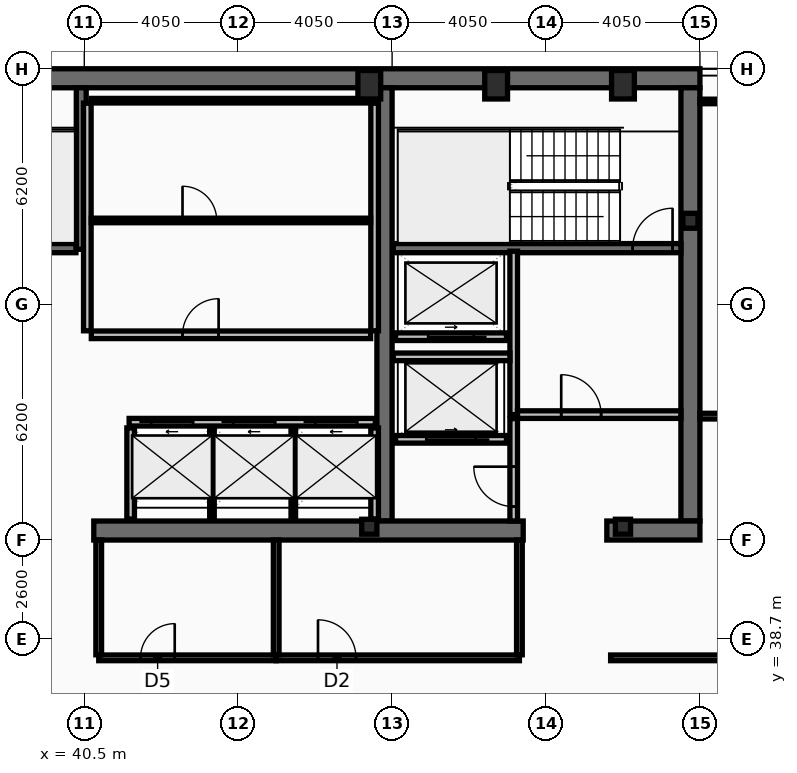
"""IFC4 building model, lengths in metres.
Left out: names, types, materials, properties, quantities, classifications, styles, units other than length and angle.
Written with IfcOpenShell. Run it as: python <this file> out.ifc"""

import sys

from ifc_helpers import new_model, si_unit, direction, frame, frame_2d, origin, origin_2d, place, context, subcontext, project, spatial, rectangle, hollow_rectangle, i_section, extrude, element, fill, save


model = new_model("IFC4")
c1 = context("Model", 3, precision=1e-05, world=origin(), true_north=direction((0.0, 1.0)))
c2 = subcontext(c1, "Body", "Model", "MODEL_VIEW")
j1 = project(units=[si_unit("LENGTHUNIT", "METRE"), si_unit("PLANEANGLEUNIT", "RADIAN")], contexts=[c1])
p1 = place(None, origin())
s1 = spatial("IfcSite", under=j1, at=p1, CompositionType="ELEMENT")
p2 = place(p1, origin())
s2 = spatial("IfcBuilding", under=s1, at=p2, CompositionType="ELEMENT")
p3 = place(p2, frame((0.0, 0.0, 280.6)))
s3 = spatial("IfcBuildingStorey", under=s2, at=p3, CompositionType="ELEMENT", Elevation=280.6)
p4 = place(p3, frame((16.2, 53.45, 0.0), z_axis=(0.0, 0.0, 1.0), x_axis=(1.0, 0.0, 0.0)))
e1 = element("IfcWall", 1, at=p4, inside=s3, PredefinedType="SHEAR", context=c2, shape_type="SweptSolid", body=[
    extrude(rectangle(XDim=40.5, YDim=0.5, at=frame_2d((20.25, 0.0))), origin(), (0.0, 0.0, 1.0), 3.44),
])
p5 = place(p3, frame((56.45, 53.2, 0.0), z_axis=(0.0, 0.0, 1.0), x_axis=(0.0, -1.0, 0.0)))
e2 = element("IfcWall", 2, at=p5, inside=s3, PredefinedType="SHEAR", context=c2, shape_type="SweptSolid", body=[
    extrude(rectangle(XDim=11.4, YDim=0.5, at=frame_2d((5.7, 0.0))), origin(), (0.0, 0.0, 1.0), 3.44),
])
p6 = place(p3, frame((48.4, 41.8, 0.0), z_axis=(0.0, 0.0, 1.0), x_axis=(0.0, 1.0, 0.0)))
e3 = element("IfcWall", 3, at=p6, inside=s3, PredefinedType="SHEAR", context=c2, shape_type="SweptSolid", body=[
    extrude(rectangle(XDim=11.4, YDim=0.4, at=frame_2d((5.7, 0.0))), origin(), (0.0, 0.0, 1.0), 3.44),
])
p7 = place(p3, frame((52.05, 41.55, 0.0), z_axis=(0.0, 0.0, 1.0), x_axis=(-1.0, 0.0, 0.0)))
e4 = element("IfcWall", 4, at=p7, inside=s3, PredefinedType="SHEAR", context=c2, shape_type="SweptSolid", body=[
    extrude(rectangle(XDim=11.3, YDim=0.5, at=frame_2d((5.65, 0.0))), origin(), (0.0, 0.0, 1.0), 3.44),
])
p8 = place(p3, frame((56.7, 41.55, 0.0), z_axis=(0.0, 0.0, 1.0), x_axis=(-1.0, 0.0, 0.0)))
e5 = element("IfcWall", 5, at=p8, inside=s3, PredefinedType="SHEAR", context=c2, shape_type="SweptSolid", body=[
    extrude(rectangle(XDim=2.45, YDim=0.5, at=frame_2d((1.225, 0.0))), origin(), (0.0, 0.0, 1.0), 3.44),
])
p9 = place(p3, frame((40.42, 48.95, 0.0), z_axis=(0.0, 0.0, 1.0), x_axis=(0.0, 1.0, 0.0)))
e6 = element("IfcWall", 6, at=p9, inside=s3, PredefinedType="SHEAR", context=c2, shape_type="SweptSolid", body=[
    extrude(rectangle(XDim=4.25, YDim=0.26, at=frame_2d((2.125, 0.0))), origin(), (0.0, 0.0, 1.0), 3.44),
])
p10 = place(p3, frame((48.63, 48.98, 0.0), z_axis=(0.0, 0.0, 1.0), x_axis=(1.0, 0.0, 0.0)))
e7 = element("IfcWall", 7, at=p10, inside=s3, PredefinedType="SHEAR", context=c2, shape_type="SweptSolid", body=[
    extrude(rectangle(XDim=7.57, YDim=0.24, at=frame_2d((3.785, 0.0))), origin(), (0.0, 0.0, 1.0), 3.44),
])
p11 = place(p10, frame((6.3, 0.0, 0.0)))
e8 = element("IfcOpeningElement", 8, at=p11, cuts=e7, PredefinedType="OPENING", context=c2, shape_type="SweptSolid", body=[
    extrude(rectangle(XDim=1.05, YDim=2.15, at=frame_2d((0.525, 1.075))), frame((0.0, 0.13, 0.0), z_axis=(0.0, -1.0, 0.0), x_axis=(1.0, 0.0, 0.0)), (0.0, 0.0, 1.0), 0.26),
])
p12 = place(p3, frame((32.72, 48.98, 0.0), z_axis=(0.0, 0.0, 1.0), x_axis=(1.0, 0.0, 0.0)))
e9 = element("IfcWall", 9, at=p12, inside=s3, PredefinedType="SHEAR", context=c2, shape_type="SweptSolid", body=[
    extrude(rectangle(XDim=7.56, YDim=0.24, at=frame_2d((3.78, 0.0))), origin(), (0.0, 0.0, 1.0), 3.44),
])
p13 = place(p12, frame((0.22, 0.0, 0.0)))
e10 = element("IfcOpeningElement", 10, at=p13, cuts=e9, PredefinedType="OPENING", context=c2, shape_type="SweptSolid", body=[
    extrude(rectangle(XDim=1.05, YDim=2.15, at=frame_2d((0.525, 1.075))), frame((0.0, 0.13, 0.0), z_axis=(0.0, -1.0, 0.0), x_axis=(1.0, 0.0, 0.0)), (0.0, 0.0, 1.0), 0.26),
])
for number, where, z_axis, x_axis in (
    (11, (48.0, 53.28, 0.0), (0.0, 0.0, 1.0), (1.0, 0.0, 0.0)),
    (12, (51.337, 53.28, 0.0), (0.0, 0.0, 1.0), (1.0, 0.0, 0.0)),
    (13, (54.675, 53.28, 0.0), (0.0, 0.0, 1.0), (1.0, 0.0, 0.0)),
):
    element("IfcColumn", number, at=place(p3, frame(where, z_axis=z_axis, x_axis=x_axis)), inside=s3, PredefinedType="COLUMN", context=c2, shape_type="SweptSolid", body=[
        extrude(hollow_rectangle(XDim=0.6, YDim=0.75, WallThickness=0.045, at=origin_2d()), origin(), (0.0, 0.0, 1.0), 3.6),
    ])
for number, where, z_axis, x_axis in (
    (14, (56.45, 49.7, 0.0), (0.0, 0.0, 1.0), (1.0, 0.0, 0.0)),
    (15, (48.0, 41.65, 0.0), (0.0, 0.0, 1.0), (1.0, 0.0, 0.0)),
    (16, (54.675, 41.65, 0.0), (0.0, 0.0, 1.0), (1.0, 0.0, 0.0)),
):
    element("IfcColumn", number, at=place(p3, frame(where, z_axis=z_axis, x_axis=x_axis)), inside=s3, PredefinedType="COLUMN", context=c2, shape_type="SweptSolid", body=[
        extrude(i_section(OverallWidth=0.399, OverallDepth=0.393, WebThickness=0.023, FlangeThickness=0.037, at=origin_2d()), origin(), (0.0, 0.0, 1.0), 3.6),
    ])
p14 = place(p3, frame((41.68, 44.4, 0.0), z_axis=(0.0, 0.0, 1.0), x_axis=(1.0, 0.0, 0.0)))
e17 = element("IfcWall", 17, at=p14, inside=s3, PredefinedType="PARTITIONING", context=c2, shape_type="SweptSolid", body=[
    extrude(rectangle(XDim=6.48, YDim=0.2, at=frame_2d((3.24, 0.0))), origin(), (0.0, 0.0, 1.0), 3.44),
])
p15 = place(p14, frame((0.58, 0.0, 0.0)))
e18 = element("IfcOpeningElement", 18, at=p15, cuts=e17, PredefinedType="OPENING", context=c2, shape_type="SweptSolid", body=[
    extrude(rectangle(XDim=1.1, YDim=2.18, at=frame_2d((0.55, 1.09))), frame((0.0, 0.11, 0.0), z_axis=(0.0, -1.0, 0.0), x_axis=(1.0, 0.0, 0.0)), (0.0, 0.0, 1.0), 0.22),
])
p16 = place(p14, frame((2.74, 0.0, 0.0)))
e19 = element("IfcOpeningElement", 19, at=p16, cuts=e17, PredefinedType="OPENING", context=c2, shape_type="SweptSolid", body=[
    extrude(rectangle(XDim=1.1, YDim=2.18, at=frame_2d((0.55, 1.09))), frame((0.0, 0.11, 0.0), z_axis=(0.0, -1.0, 0.0), x_axis=(1.0, 0.0, 0.0)), (0.0, 0.0, 1.0), 0.22),
])
p17 = place(p14, frame((4.9, 0.0, 0.0)))
e20 = element("IfcOpeningElement", 20, at=p17, cuts=e17, PredefinedType="OPENING", context=c2, shape_type="SweptSolid", body=[
    extrude(rectangle(XDim=1.1, YDim=2.18, at=frame_2d((0.55, 1.09))), frame((0.0, 0.11, 0.0), z_axis=(0.0, -1.0, 0.0), x_axis=(1.0, 0.0, 0.0)), (0.0, 0.0, 1.0), 0.22),
])
p18 = place(p3, frame((51.61, 43.95, 0.0), z_axis=(0.0, 0.0, 1.0), x_axis=(-1.0, 0.0, 0.0)))
e21 = element("IfcWall", 21, at=p18, inside=s3, PredefinedType="PARTITIONING", context=c2, shape_type="SweptSolid", body=[
    extrude(rectangle(XDim=2.92, YDim=0.2, at=frame_2d((1.46, 0.0))), origin(), (0.0, 0.0, 1.0), 3.44),
])
p19 = place(p18, frame((0.81, 0.0, 0.0)))
e22 = element("IfcOpeningElement", 22, at=p19, cuts=e21, PredefinedType="OPENING", context=c2, shape_type="SweptSolid", body=[
    extrude(rectangle(XDim=1.3, YDim=2.18, at=frame_2d((0.65, 1.09))), frame((0.0, 0.11, 0.0), z_axis=(0.0, -1.0, 0.0), x_axis=(1.0, 0.0, 0.0)), (0.0, 0.0, 1.0), 0.22),
])
p20 = place(p3, frame((51.61, 46.65, 0.0), z_axis=(0.0, 0.0, 1.0), x_axis=(-1.0, 0.0, 0.0)))
e23 = element("IfcWall", 23, at=p20, inside=s3, PredefinedType="PARTITIONING", context=c2, shape_type="SweptSolid", body=[
    extrude(rectangle(XDim=2.92, YDim=0.2, at=frame_2d((1.46, 0.0))), origin(), (0.0, 0.0, 1.0), 3.44),
])
p21 = place(p20, frame((0.86, 0.0, 0.0)))
e24 = element("IfcOpeningElement", 24, at=p21, cuts=e23, PredefinedType="OPENING", context=c2, shape_type="SweptSolid", body=[
    extrude(rectangle(XDim=1.2, YDim=2.18, at=frame_2d((0.6, 1.09))), frame((0.0, 0.11, 0.0), z_axis=(0.0, -1.0, 0.0), x_axis=(1.0, 0.0, 0.0)), (0.0, 0.0, 1.0), 0.22),
])
p22 = place(p3, frame((51.8, 44.6, 0.0), z_axis=(0.0, 0.0, 1.0), x_axis=(0.0, 1.0, 0.0)))
e25 = element("IfcWall", 25, at=p22, inside=s3, PredefinedType="PARTITIONING", context=c2, shape_type="SweptSolid", body=[
    extrude(rectangle(XDim=4.3, YDim=0.2, at=frame_2d((2.15, 0.0))), origin(), (0.0, 0.0, 1.0), 3.44),
])
p23 = place(p3, frame((51.9, 44.6, 0.0), z_axis=(0.0, 0.0, 1.0), x_axis=(1.0, 0.0, 0.0)))
e26 = element("IfcWall", 26, at=p23, inside=s3, PredefinedType="PARTITIONING", context=c2, shape_type="SweptSolid", body=[
    extrude(rectangle(XDim=4.3, YDim=0.2, at=frame_2d((2.15, 0.0))), origin(), (0.0, 0.0, 1.0), 3.44),
])
p24 = place(p23, frame((1.15, 0.0, 0.0)))
e27 = element("IfcOpeningElement", 27, at=p24, cuts=e26, PredefinedType="OPENING", context=c2, shape_type="SweptSolid", body=[
    extrude(rectangle(XDim=1.05, YDim=2.15, at=frame_2d((0.525, 1.075))), frame((0.0, 0.11, 0.0), z_axis=(0.0, -1.0, 0.0), x_axis=(1.0, 0.0, 0.0)), (0.0, 0.0, 1.0), 0.22),
])
p25 = place(p3, frame((48.63, 46.12, 0.0), z_axis=(0.0, 0.0, 1.0), x_axis=(1.0, 0.0, 0.0)))
e28 = element("IfcWall", 28, at=p25, inside=s3, PredefinedType="PARTITIONING", context=c2, shape_type="SweptSolid", body=[
    extrude(rectangle(XDim=3.07, YDim=0.2, at=frame_2d((1.535, 0.0))), origin(), (0.0, 0.0, 1.0), 3.44),
])
p26 = place(p3, frame((51.8, 41.8, 0.0), z_axis=(0.0, 0.0, 1.0), x_axis=(0.0, 1.0, 0.0)))
e29 = element("IfcWall", 29, at=p26, inside=s3, PredefinedType="PARTITIONING", context=c2, shape_type="SweptSolid", body=[
    extrude(rectangle(XDim=2.695, YDim=0.2, at=frame_2d((1.348, 0.0))), origin(), (0.0, 0.0, 1.0), 3.44),
])
p27 = place(p26, frame((0.38, 0.0, 0.0)))
e30 = element("IfcOpeningElement", 30, at=p27, cuts=e29, PredefinedType="OPENING", context=c2, shape_type="SweptSolid", body=[
    extrude(rectangle(XDim=1.05, YDim=2.15, at=frame_2d((0.525, 1.075))), frame((0.0, 0.11, 0.0), z_axis=(0.0, -1.0, 0.0), x_axis=(1.0, 0.0, 0.0)), (0.0, 0.0, 1.0), 0.22),
])
for number, where, z_axis, x_axis in (
    (31, (40.58, 46.805, 0.0), (0.0, 0.0, 1.0), (0.0, 1.0, 0.0)),
    (32, (48.14, 46.805, 0.0), (0.0, 0.0, 1.0), (0.0, 1.0, 0.0)),
):
    element("IfcWall", number, at=place(p3, frame(where, z_axis=z_axis, x_axis=x_axis)), inside=s3, PredefinedType="PARTITIONING", context=c2, shape_type="SweptSolid", body=[
        extrude(rectangle(XDim=5.99, YDim=0.2, at=frame_2d((2.995, 0.0))), origin(), (0.0, 0.0, 1.0), 3.44),
    ])
p28 = place(p3, frame((40.685, 52.86, 0.0), z_axis=(0.0, 0.0, 1.0), x_axis=(1.0, 0.0, 0.0)))
e33 = element("IfcWall", 33, at=p28, inside=s3, PredefinedType="PARTITIONING", context=c2, shape_type="SweptSolid", body=[
    extrude(rectangle(XDim=7.35, YDim=0.12, at=frame_2d((3.675, 0.0))), origin(), (0.0, 0.0, 1.0), 3.44),
])
p29 = place(p3, frame((40.685, 49.709, 0.0), z_axis=(0.0, 0.0, 1.0), x_axis=(1.0, 0.0, 0.0)))
e34 = element("IfcWall", 34, at=p29, inside=s3, PredefinedType="PARTITIONING", context=c2, shape_type="SweptSolid", body=[
    extrude(rectangle(XDim=7.35, YDim=0.12, at=frame_2d((3.675, 0.0))), origin(), (0.0, 0.0, 1.0), 3.44),
])
p30 = place(p29, frame((2.4, 0.0, 0.0)))
e35 = element("IfcOpeningElement", 35, at=p30, cuts=e34, PredefinedType="OPENING", context=c2, shape_type="SweptSolid", body=[
    extrude(rectangle(XDim=0.9, YDim=2.05, at=frame_2d((0.45, 1.025))), frame((0.0, 0.07, 0.0), z_axis=(0.0, -1.0, 0.0), x_axis=(1.0, 0.0, 0.0)), (0.0, 0.0, 1.0), 0.14),
])
p31 = place(p3, frame((40.685, 46.7, 0.0), z_axis=(0.0, 0.0, 1.0), x_axis=(1.0, 0.0, 0.0)))
e36 = element("IfcWall", 36, at=p31, inside=s3, PredefinedType="PARTITIONING", context=c2, shape_type="SweptSolid", body=[
    extrude(rectangle(XDim=7.35, YDim=0.2, at=frame_2d((3.675, 0.0))), origin(), (0.0, 0.0, 1.0), 3.44),
])
p32 = place(p31, frame((2.4, 0.0, 0.0)))
e37 = element("IfcOpeningElement", 37, at=p32, cuts=e36, PredefinedType="OPENING", context=c2, shape_type="SweptSolid", body=[
    extrude(rectangle(XDim=0.95, YDim=2.1, at=frame_2d((0.475, 1.05))), frame((0.0, 0.11, 0.0), z_axis=(0.0, -1.0, 0.0), x_axis=(1.0, 0.0, 0.0)), (0.0, 0.0, 1.0), 0.22),
])
for number, where, z_axis, x_axis in (
    (38, (41.72, 41.85, 0.0), (0.0, 0.0, 1.0), (0.0, 1.0, 0.0)),
    (39, (48.14, 41.85, 0.0), (0.0, 0.0, 1.0), (0.0, 1.0, 0.0)),
):
    element("IfcWall", number, at=place(p3, frame(where, z_axis=z_axis, x_axis=x_axis)), inside=s3, PredefinedType="PARTITIONING", context=c2, shape_type="SweptSolid", body=[
        extrude(rectangle(XDim=2.4, YDim=0.2, at=frame_2d((1.2, 0.0))), origin(), (0.0, 0.0, 1.0), 3.44),
    ])
for number, where, z_axis, x_axis in (
    (40, (43.86, 41.85, 0.0), (0.0, 0.0, 1.0), (0.0, 1.0, 0.0)),
    (41, (46.0, 41.85, 0.0), (0.0, 0.0, 1.0), (0.0, 1.0, 0.0)),
):
    element("IfcWall", number, at=place(p3, frame(where, z_axis=z_axis, x_axis=x_axis)), inside=s3, PredefinedType="PARTITIONING", context=c2, shape_type="SweptSolid", body=[
        extrude(rectangle(XDim=2.4, YDim=0.12, at=frame_2d((1.2, 0.0))), origin(), (0.0, 0.0, 1.0), 3.44),
    ])
p33 = place(p3, frame((40.88, 38.2, 0.0), z_axis=(0.0, 0.0, 1.0), x_axis=(1.0, 0.0, 0.0)))
e42 = element("IfcWall", 42, at=p33, inside=s3, PredefinedType="PARTITIONING", context=c2, shape_type="SweptSolid", body=[
    extrude(rectangle(XDim=4.67, YDim=0.15, at=frame_2d((2.335, 0.0))), origin(), (0.0, 0.0, 1.0), 2.78),
])
p34 = place(p33, frame((1.1, 0.0, 0.0)))
e43 = element("IfcOpeningElement", 43, at=p34, cuts=e42, PredefinedType="OPENING", context=c2, shape_type="SweptSolid", body=[
    extrude(rectangle(XDim=0.9, YDim=2.05, at=frame_2d((0.45, 1.025))), frame((0.0, 0.085, 0.0), z_axis=(0.0, -1.0, 0.0), x_axis=(1.0, 0.0, 0.0)), (0.0, 0.0, 1.0), 0.17),
])
p35 = place(p3, frame((45.55, 38.2, 0.0), z_axis=(0.0, 0.0, 1.0), x_axis=(1.0, 0.0, 0.0)))
e44 = element("IfcWall", 44, at=p35, inside=s3, PredefinedType="PARTITIONING", context=c2, shape_type="SweptSolid", body=[
    extrude(rectangle(XDim=6.4, YDim=0.15, at=frame_2d((3.2, 0.0))), origin(), (0.0, 0.0, 1.0), 2.78),
])
p36 = place(p35, frame((1.1, 0.0, 0.0)))
e45 = element("IfcOpeningElement", 45, at=p36, cuts=e44, PredefinedType="OPENING", context=c2, shape_type="SweptSolid", body=[
    extrude(rectangle(XDim=1.0, YDim=2.05, at=frame_2d((0.5, 1.025))), frame((0.0, 0.085, 0.0), z_axis=(0.0, -1.0, 0.0), x_axis=(1.0, 0.0, 0.0)), (0.0, 0.0, 1.0), 0.17),
])
for number, where, z_axis, x_axis in (
    (46, (40.88, 38.28, 0.0), (0.0, 0.0, 1.0), (0.0, 1.0, 0.0)),
    (47, (45.55, 38.28, 0.0), (0.0, 0.0, 1.0), (0.0, 1.0, 0.0)),
    (48, (51.95, 38.28, 0.0), (0.0, 0.0, 1.0), (0.0, 1.0, 0.0)),
):
    element("IfcWall", number, at=place(p3, frame(where, z_axis=z_axis, x_axis=x_axis)), inside=s3, PredefinedType="PARTITIONING", context=c2, shape_type="SweptSolid", body=[
        extrude(rectangle(XDim=3.02, YDim=0.15, at=frame_2d((1.51, 0.0))), origin(), (0.0, 0.0, 1.0), 3.44),
    ])
p37 = place(p3, frame((54.35, 38.2, 0.0), z_axis=(0.0, 0.0, 1.0), x_axis=(1.0, 0.0, 0.0)))
e49 = element("IfcWall", 49, at=p37, inside=s3, PredefinedType="PARTITIONING", context=c2, shape_type="SweptSolid", body=[
    extrude(rectangle(XDim=8.52, YDim=0.15, at=frame_2d((4.26, 0.0))), origin(), (0.0, 0.0, 1.0), 2.78),
])
p38 = place(p37, frame((3.25, 0.0, 0.0)))
e50 = element("IfcOpeningElement", 50, at=p38, cuts=e49, PredefinedType="OPENING", context=c2, shape_type="SweptSolid", body=[
    extrude(rectangle(XDim=0.95, YDim=2.05, at=frame_2d((0.475, 1.025))), frame((0.0, 0.085, 0.0), z_axis=(0.0, -1.0, 0.0), x_axis=(1.0, 0.0, 0.0)), (0.0, 0.0, 1.0), 0.17),
])
p39 = place(p3, frame((56.7, 44.56, 0.0), z_axis=(0.0, 0.0, 1.0), x_axis=(1.0, 0.0, 0.0)))
e51 = element("IfcWall", 51, at=p39, inside=s3, PredefinedType="PARTITIONING", context=c2, shape_type="SweptSolid", body=[
    extrude(rectangle(XDim=6.105, YDim=0.15, at=frame_2d((3.052, 0.0))), origin(), (0.0, 0.0, 1.0), 2.88),
])
p40 = place(p39, frame((0.9, 0.0, 0.0)))
e52 = element("IfcOpeningElement", 52, at=p40, cuts=e51, PredefinedType="OPENING", context=c2, shape_type="SweptSolid", body=[
    extrude(rectangle(XDim=0.9, YDim=2.05, at=frame_2d((0.45, 1.025))), frame((0.0, 0.085, 0.0), z_axis=(0.0, -1.0, 0.0), x_axis=(1.0, 0.0, 0.0)), (0.0, 0.0, 1.0), 0.17),
])
p41 = place(p3, frame((56.7, 52.84, 0.0), z_axis=(0.0, 0.0, 1.0), x_axis=(1.0, 0.0, 0.0)))
e53 = element("IfcWall", 53, at=p41, inside=s3, PredefinedType="PARTITIONING", context=c2, shape_type="SweptSolid", body=[
    extrude(rectangle(XDim=6.105, YDim=0.12, at=frame_2d((3.052, 0.0))), origin(), (0.0, 0.0, 1.0), 3.44),
])
p42 = place(p11, origin())
e54 = element("IfcDoor", 54, at=p42, inside=s3, OperationType="SINGLE_SWING_RIGHT", PredefinedType="DOOR", context=c2, shape_type="SweptSolid", body=[
    extrude(rectangle(XDim=1.05, YDim=2.15, at=frame_2d((0.525, 1.075))), frame((0.0, 0.025, 0.0), z_axis=(0.0, -1.0, 0.0), x_axis=(1.0, 0.0, 0.0)), (0.0, 0.0, 1.0), 0.05),
])
fill(e8, e54)
p43 = place(p15, origin())
e55 = element("IfcDoor", 55, at=p43, inside=s3, OperationType="SLIDING_TO_LEFT", PredefinedType="DOOR", context=c2, shape_type="SweptSolid", body=[
    extrude(rectangle(XDim=1.1, YDim=2.18, at=frame_2d((0.55, 1.09))), frame((0.0, 0.025, 0.0), z_axis=(0.0, -1.0, 0.0), x_axis=(1.0, 0.0, 0.0)), (0.0, 0.0, 1.0), 0.05),
])
fill(e18, e55)
p44 = place(p16, origin())
e56 = element("IfcDoor", 56, at=p44, inside=s3, OperationType="SLIDING_TO_LEFT", PredefinedType="DOOR", context=c2, shape_type="SweptSolid", body=[
    extrude(rectangle(XDim=1.1, YDim=2.18, at=frame_2d((0.55, 1.09))), frame((0.0, 0.025, 0.0), z_axis=(0.0, -1.0, 0.0), x_axis=(1.0, 0.0, 0.0)), (0.0, 0.0, 1.0), 0.05),
])
fill(e19, e56)
p45 = place(p17, origin())
e57 = element("IfcDoor", 57, at=p45, inside=s3, OperationType="SLIDING_TO_LEFT", PredefinedType="DOOR", context=c2, shape_type="SweptSolid", body=[
    extrude(rectangle(XDim=1.1, YDim=2.18, at=frame_2d((0.55, 1.09))), frame((0.0, 0.025, 0.0), z_axis=(0.0, -1.0, 0.0), x_axis=(1.0, 0.0, 0.0)), (0.0, 0.0, 1.0), 0.05),
])
fill(e20, e57)
p46 = place(p19, origin())
e58 = element("IfcDoor", 58, at=p46, inside=s3, OperationType="SLIDING_TO_LEFT", PredefinedType="DOOR", context=c2, shape_type="SweptSolid", body=[
    extrude(rectangle(XDim=1.3, YDim=2.18, at=frame_2d((0.65, 1.09))), frame((0.0, 0.025, 0.0), z_axis=(0.0, -1.0, 0.0), x_axis=(1.0, 0.0, 0.0)), (0.0, 0.0, 1.0), 0.05),
])
fill(e22, e58)
p47 = place(p21, origin())
e59 = element("IfcDoor", 59, at=p47, inside=s3, OperationType="SLIDING_TO_LEFT", PredefinedType="DOOR", context=c2, shape_type="SweptSolid", body=[
    extrude(rectangle(XDim=1.2, YDim=2.18, at=frame_2d((0.6, 1.09))), frame((0.0, 0.025, 0.0), z_axis=(0.0, -1.0, 0.0), x_axis=(1.0, 0.0, 0.0)), (0.0, 0.0, 1.0), 0.05),
])
fill(e24, e59)
p48 = place(p24, origin())
e60 = element("IfcDoor", 60, at=p48, inside=s3, OperationType="SINGLE_SWING_LEFT", PredefinedType="DOOR", context=c2, shape_type="SweptSolid", body=[
    extrude(rectangle(XDim=1.05, YDim=2.15, at=frame_2d((0.525, 1.075))), frame((0.0, 0.025, 0.0), z_axis=(0.0, -1.0, 0.0), x_axis=(1.0, 0.0, 0.0)), (0.0, 0.0, 1.0), 0.05),
])
fill(e27, e60)
p49 = place(p27, origin())
e61 = element("IfcDoor", 61, at=p49, inside=s3, OperationType="SINGLE_SWING_RIGHT", PredefinedType="DOOR", context=c2, shape_type="SweptSolid", body=[
    extrude(rectangle(XDim=1.05, YDim=2.15, at=frame_2d((0.525, 1.075))), frame((0.0, 0.025, 0.0), z_axis=(0.0, -1.0, 0.0), x_axis=(1.0, 0.0, 0.0)), (0.0, 0.0, 1.0), 0.05),
])
fill(e30, e61)
p50 = place(p30, origin())
e62 = element("IfcDoor", 62, at=p50, inside=s3, OperationType="SINGLE_SWING_LEFT", PredefinedType="DOOR", context=c2, shape_type="SweptSolid", body=[
    extrude(rectangle(XDim=0.9, YDim=2.05, at=frame_2d((0.45, 1.025))), frame((0.0, 0.025, 0.0), z_axis=(0.0, -1.0, 0.0), x_axis=(1.0, 0.0, 0.0)), (0.0, 0.0, 1.0), 0.05),
])
fill(e35, e62)
p51 = place(p32, origin())
e63 = element("IfcDoor", 63, at=p51, inside=s3, OperationType="SINGLE_SWING_RIGHT", PredefinedType="DOOR", context=c2, shape_type="SweptSolid", body=[
    extrude(rectangle(XDim=0.95, YDim=2.1, at=frame_2d((0.475, 1.05))), frame((0.0, 0.025, 0.0), z_axis=(0.0, -1.0, 0.0), x_axis=(1.0, 0.0, 0.0)), (0.0, 0.0, 1.0), 0.05),
])
fill(e37, e63)
p52 = place(p34, origin())
e64 = element("IfcDoor", 64, at=p52, inside=s3, OperationType="SINGLE_SWING_RIGHT", PredefinedType="DOOR", context=c2, shape_type="SweptSolid", body=[
    extrude(rectangle(XDim=0.9, YDim=2.05, at=frame_2d((0.45, 1.025))), frame((0.0, 0.025, 0.0), z_axis=(0.0, -1.0, 0.0), x_axis=(1.0, 0.0, 0.0)), (0.0, 0.0, 1.0), 0.05),
])
fill(e43, e64)
p53 = place(p36, origin())
e65 = element("IfcDoor", 65, at=p53, inside=s3, OperationType="SINGLE_SWING_LEFT", PredefinedType="DOOR", context=c2, shape_type="SweptSolid", body=[
    extrude(rectangle(XDim=1.0, YDim=2.05, at=frame_2d((0.5, 1.025))), frame((0.0, 0.025, 0.0), z_axis=(0.0, -1.0, 0.0), x_axis=(1.0, 0.0, 0.0)), (0.0, 0.0, 1.0), 0.05),
])
fill(e45, e65)
save(model, sys.argv[1])
